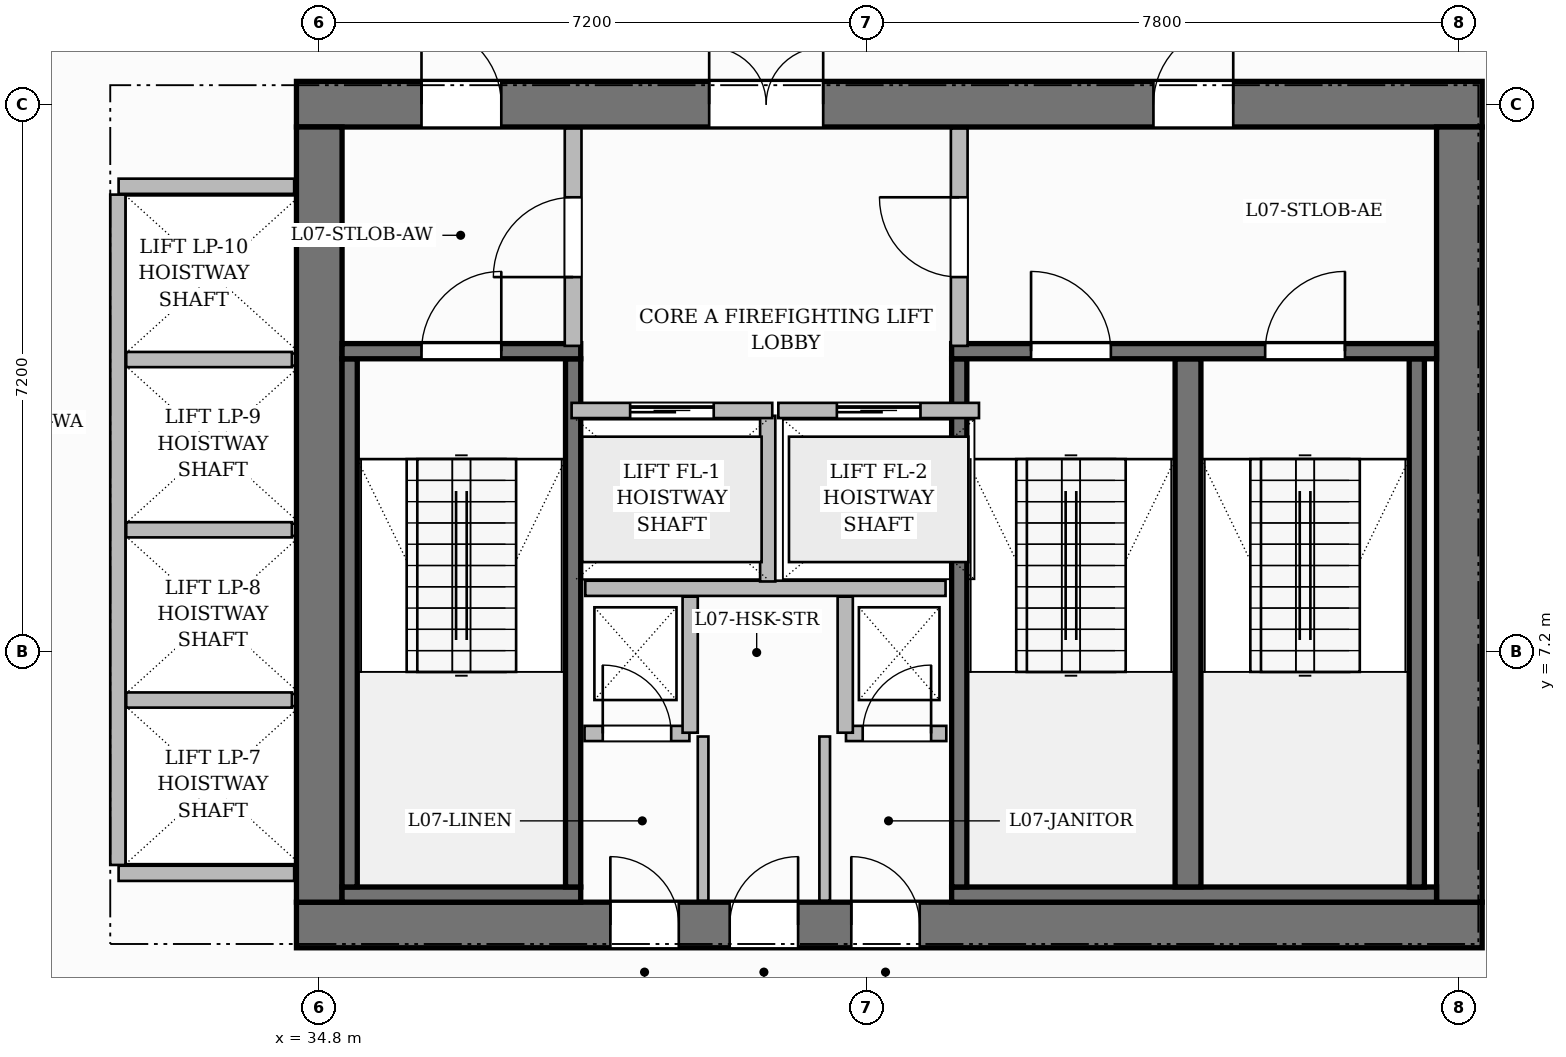
"""IFC4 building model, lengths in metres.
Left out: names, types, materials, properties, quantities, classifications, styles, units other than length and angle.
Written with IfcOpenShell. Run it as: python <this file> out.ifc"""

import sys

from ifc_helpers import new_model, si_unit, direction, frame, frame_2d, origin, place, context, subcontext, project, spatial, rectangle, extrude, source, transform, mapped, element, fill, save


model = new_model("IFC4")
c1 = context("Model", 3, precision=1e-05, world=origin(), true_north=direction((0.0, 1.0)))
c2 = subcontext(c1, "Body", "Model", "MODEL_VIEW")
j1 = project(units=[si_unit("LENGTHUNIT", "METRE"), si_unit("PLANEANGLEUNIT", "RADIAN")], contexts=[c1])
p1 = place(None, origin())
s1 = spatial("IfcSite", under=j1, at=p1, CompositionType="ELEMENT")
p2 = place(p1, origin())
s2 = spatial("IfcBuilding", under=s1, at=p2, CompositionType="ELEMENT")
p3 = place(p2, frame((0.0, 0.0, 36.1)))
s3 = spatial("IfcBuildingStorey", under=s2, at=p3, CompositionType="ELEMENT", Elevation=36.1)
p4 = place(p3, frame((34.5, 3.6, 0.0), z_axis=(0.0, 0.0, 1.0), x_axis=(1.0, 0.0, 0.0)))
e1 = element("IfcWall", 1, at=p4, inside=s3, PredefinedType="SHEAR", context=c2, shape_type="SweptSolid", body=[
    extrude(rectangle(XDim=15.6, YDim=0.6, at=frame_2d((7.8, 0.0))), origin(), (0.0, 0.0, 1.0), 3.7),
])
p5 = place(p4, frame((4.13, 0.0, 0.0)))
e2 = element("IfcOpeningElement", 2, at=p5, cuts=e1, PredefinedType="OPENING", context=c2, shape_type="SweptSolid", body=[
    extrude(rectangle(XDim=0.9, YDim=2.1, at=frame_2d((0.45, 1.05))), frame((0.0, 0.31, 0.0), z_axis=(0.0, -1.0, 0.0), x_axis=(1.0, 0.0, 0.0)), (0.0, 0.0, 1.0), 0.62),
])
p6 = place(p4, frame((5.7, 0.0, 0.0)))
e3 = element("IfcOpeningElement", 3, at=p6, cuts=e1, PredefinedType="OPENING", context=c2, shape_type="SweptSolid", body=[
    extrude(rectangle(XDim=0.9, YDim=2.1, at=frame_2d((0.45, 1.05))), frame((0.0, 0.31, 0.0), z_axis=(0.0, -1.0, 0.0), x_axis=(1.0, 0.0, 0.0)), (0.0, 0.0, 1.0), 0.62),
])
p7 = place(p4, frame((7.3, 0.0, 0.0)))
e4 = element("IfcOpeningElement", 4, at=p7, cuts=e1, PredefinedType="OPENING", context=c2, shape_type="SweptSolid", body=[
    extrude(rectangle(XDim=0.9, YDim=2.1, at=frame_2d((0.45, 1.05))), frame((0.0, 0.31, 0.0), z_axis=(0.0, -1.0, 0.0), x_axis=(1.0, 0.0, 0.0)), (0.0, 0.0, 1.0), 0.62),
])
p8 = place(p3, frame((34.5, 14.4, 0.0), z_axis=(0.0, 0.0, 1.0), x_axis=(1.0, 0.0, 0.0)))
e5 = element("IfcWall", 5, at=p8, inside=s3, PredefinedType="SHEAR", context=c2, shape_type="SweptSolid", body=[
    extrude(rectangle(XDim=15.6, YDim=0.6, at=frame_2d((7.8, 0.0))), origin(), (0.0, 0.0, 1.0), 3.7),
])
p9 = place(p8, frame((5.43, 0.0, 0.0)))
e6 = element("IfcOpeningElement", 6, at=p9, cuts=e5, PredefinedType="OPENING", context=c2, shape_type="SweptSolid", body=[
    extrude(rectangle(XDim=1.5, YDim=2.2, at=frame_2d((0.75, 1.1))), frame((0.0, 0.31, 0.0), z_axis=(0.0, -1.0, 0.0), x_axis=(1.0, 0.0, 0.0)), (0.0, 0.0, 1.0), 0.62),
])
p10 = place(p8, frame((1.645, 0.0, 0.0)))
e7 = element("IfcOpeningElement", 7, at=p10, cuts=e5, PredefinedType="OPENING", context=c2, shape_type="SweptSolid", body=[
    extrude(rectangle(XDim=1.05, YDim=2.15, at=frame_2d((0.525, 1.075))), frame((0.0, 0.31, 0.0), z_axis=(0.0, -1.0, 0.0), x_axis=(1.0, 0.0, 0.0)), (0.0, 0.0, 1.0), 0.62),
])
p11 = place(p8, frame((11.275, 0.0, 0.0)))
e8 = element("IfcOpeningElement", 8, at=p11, cuts=e5, PredefinedType="OPENING", context=c2, shape_type="SweptSolid", body=[
    extrude(rectangle(XDim=1.05, YDim=2.15, at=frame_2d((0.525, 1.075))), frame((0.0, 0.31, 0.0), z_axis=(0.0, -1.0, 0.0), x_axis=(1.0, 0.0, 0.0)), (0.0, 0.0, 1.0), 0.62),
])
for number, where, z_axis, x_axis in (
    (9, (34.8, 3.9, 0.0), (0.0, 0.0, 1.0), (0.0, 1.0, 0.0)),
    (10, (49.8, 3.9, 0.0), (0.0, 0.0, 1.0), (0.0, 1.0, 0.0)),
):
    element("IfcWall", number, at=place(p3, frame(where, z_axis=z_axis, x_axis=x_axis)), inside=s3, PredefinedType="SHEAR", context=c2, shape_type="SweptSolid", body=[
        extrude(rectangle(XDim=10.2, YDim=0.6, at=frame_2d((5.1, 0.0))), origin(), (0.0, 0.0, 1.0), 3.7),
    ])
p12 = place(p3, frame((35.1, 4.0, 0.0), z_axis=(0.0, 0.0, 1.0), x_axis=(1.0, 0.0, 0.0)))
e11 = element("IfcWall", 11, at=p12, inside=s3, PredefinedType="SHEAR", context=c2, shape_type="SweptSolid", body=[
    extrude(rectangle(XDim=3.14, YDim=0.2, at=frame_2d((1.57, 0.0))), origin(), (0.0, 0.0, 1.0), 3.7),
])
for number, where, z_axis, x_axis in (
    (12, (35.2, 4.1, 0.0), (0.0, 0.0, 1.0), (0.0, 1.0, 0.0)),
    (13, (38.14, 4.1, 0.0), (0.0, 0.0, 1.0), (0.0, 1.0, 0.0)),
):
    element("IfcWall", number, at=place(p3, frame(where, z_axis=z_axis, x_axis=x_axis)), inside=s3, PredefinedType="SHEAR", context=c2, shape_type="SweptSolid", body=[
        extrude(rectangle(XDim=6.95, YDim=0.2, at=frame_2d((3.475, 0.0))), origin(), (0.0, 0.0, 1.0), 3.7),
    ])
p13 = place(p3, frame((35.1, 11.15, 0.0), z_axis=(0.0, 0.0, 1.0), x_axis=(1.0, 0.0, 0.0)))
e14 = element("IfcWall", 14, at=p13, inside=s3, PredefinedType="SHEAR", context=c2, shape_type="SweptSolid", body=[
    extrude(rectangle(XDim=3.14, YDim=0.2, at=frame_2d((1.57, 0.0))), origin(), (0.0, 0.0, 1.0), 3.7),
])
p14 = place(p13, frame((1.045, 0.0, 0.0)))
e15 = element("IfcOpeningElement", 15, at=p14, cuts=e14, PredefinedType="OPENING", context=c2, shape_type="SweptSolid", body=[
    extrude(rectangle(XDim=1.05, YDim=2.2, at=frame_2d((0.525, 1.1))), frame((0.0, 0.11, 0.0), z_axis=(0.0, -1.0, 0.0), x_axis=(1.0, 0.0, 0.0)), (0.0, 0.0, 1.0), 0.22),
])
p15 = place(p3, frame((43.12, 4.0, 0.0), z_axis=(0.0, 0.0, 1.0), x_axis=(1.0, 0.0, 0.0)))
e16 = element("IfcWall", 16, at=p15, inside=s3, PredefinedType="SHEAR", context=c2, shape_type="SweptSolid", body=[
    extrude(rectangle(XDim=6.38, YDim=0.2, at=frame_2d((3.19, 0.0))), origin(), (0.0, 0.0, 1.0), 3.7),
])
p16 = place(p3, frame((43.22, 4.1, 0.0), z_axis=(0.0, 0.0, 1.0), x_axis=(0.0, 1.0, 0.0)))
e17 = element("IfcWall", 17, at=p16, inside=s3, PredefinedType="SHEAR", context=c2, shape_type="SweptSolid", body=[
    extrude(rectangle(XDim=6.95, YDim=0.2, at=frame_2d((3.475, 0.0))), origin(), (0.0, 0.0, 1.0), 3.7),
])
p17 = place(p3, frame((46.23, 4.1, 0.0), z_axis=(0.0, 0.0, 1.0), x_axis=(0.0, 1.0, 0.0)))
e18 = element("IfcWall", 18, at=p17, inside=s3, PredefinedType="SHEAR", context=c2, shape_type="SweptSolid", body=[
    extrude(rectangle(XDim=6.95, YDim=0.34, at=frame_2d((3.475, 0.0))), origin(), (0.0, 0.0, 1.0), 3.7),
])
p18 = place(p3, frame((49.24, 4.1, 0.0), z_axis=(0.0, 0.0, 1.0), x_axis=(0.0, 1.0, 0.0)))
e19 = element("IfcWall", 19, at=p18, inside=s3, PredefinedType="SHEAR", context=c2, shape_type="SweptSolid", body=[
    extrude(rectangle(XDim=6.95, YDim=0.2, at=frame_2d((3.475, 0.0))), origin(), (0.0, 0.0, 1.0), 3.7),
])
p19 = place(p3, frame((43.12, 11.15, 0.0), z_axis=(0.0, 0.0, 1.0), x_axis=(1.0, 0.0, 0.0)))
e20 = element("IfcWall", 20, at=p19, inside=s3, PredefinedType="SHEAR", context=c2, shape_type="SweptSolid", body=[
    extrude(rectangle(XDim=6.38, YDim=0.2, at=frame_2d((3.19, 0.0))), origin(), (0.0, 0.0, 1.0), 3.7),
])
p20 = place(p19, frame((1.045, 0.0, 0.0)))
e21 = element("IfcOpeningElement", 21, at=p20, cuts=e20, PredefinedType="OPENING", context=c2, shape_type="SweptSolid", body=[
    extrude(rectangle(XDim=1.05, YDim=2.2, at=frame_2d((0.525, 1.1))), frame((0.0, 0.11, 0.0), z_axis=(0.0, -1.0, 0.0), x_axis=(1.0, 0.0, 0.0)), (0.0, 0.0, 1.0), 0.22),
])
p21 = place(p19, frame((4.125, 0.0, 0.0)))
e22 = element("IfcOpeningElement", 22, at=p21, cuts=e20, PredefinedType="OPENING", context=c2, shape_type="SweptSolid", body=[
    extrude(rectangle(XDim=1.05, YDim=2.2, at=frame_2d((0.525, 1.1))), frame((0.0, 0.11, 0.0), z_axis=(0.0, -1.0, 0.0), x_axis=(1.0, 0.0, 0.0)), (0.0, 0.0, 1.0), 0.22),
])
p22 = place(p3, frame((38.3, 8.03, 0.0), z_axis=(0.0, 0.0, 1.0), x_axis=(1.0, 0.0, 0.0)))
e23 = element("IfcWall", 23, at=p22, inside=s3, PredefinedType="PARTITIONING", context=c2, shape_type="SweptSolid", body=[
    extrude(rectangle(XDim=4.74, YDim=0.2, at=frame_2d((2.37, 0.0))), origin(), (0.0, 0.0, 1.0), 3.45),
])
p23 = place(p3, frame((40.7, 8.12, 0.0), z_axis=(0.0, 0.0, 1.0), x_axis=(0.0, 1.0, 0.0)))
e24 = element("IfcWall", 24, at=p23, inside=s3, PredefinedType="PARTITIONING", context=c2, shape_type="SweptSolid", body=[
    extrude(rectangle(XDim=2.18, YDim=0.2, at=frame_2d((1.09, 0.0))), origin(), (0.0, 0.0, 1.0), 3.45),
])
p24 = place(p3, frame((38.14, 11.22, 0.0), z_axis=(0.0, 0.0, 1.0), x_axis=(0.0, 1.0, 0.0)))
e25 = element("IfcWall", 25, at=p24, inside=s3, PredefinedType="PARTITIONING", context=c2, shape_type="SweptSolid", body=[
    extrude(rectangle(XDim=2.86, YDim=0.22, at=frame_2d((1.43, 0.0))), origin(), (0.0, 0.0, 1.0), 3.45),
])
p25 = place(p24, frame((0.905, 0.0, 0.0)))
e26 = element("IfcOpeningElement", 26, at=p25, cuts=e25, PredefinedType="OPENING", context=c2, shape_type="SweptSolid", body=[
    extrude(rectangle(XDim=1.05, YDim=2.15, at=frame_2d((0.525, 1.075))), frame((0.0, 0.12, 0.0), z_axis=(0.0, -1.0, 0.0), x_axis=(1.0, 0.0, 0.0)), (0.0, 0.0, 1.0), 0.24),
])
p26 = place(p3, frame((43.22, 11.22, 0.0), z_axis=(0.0, 0.0, 1.0), x_axis=(0.0, 1.0, 0.0)))
e27 = element("IfcWall", 27, at=p26, inside=s3, PredefinedType="PARTITIONING", context=c2, shape_type="SweptSolid", body=[
    extrude(rectangle(XDim=2.86, YDim=0.22, at=frame_2d((1.43, 0.0))), origin(), (0.0, 0.0, 1.0), 3.45),
])
p27 = place(p26, frame((0.905, 0.0, 0.0)))
e28 = element("IfcOpeningElement", 28, at=p27, cuts=e27, PredefinedType="OPENING", context=c2, shape_type="SweptSolid", body=[
    extrude(rectangle(XDim=1.05, YDim=2.15, at=frame_2d((0.525, 1.075))), frame((0.0, 0.12, 0.0), z_axis=(0.0, -1.0, 0.0), x_axis=(1.0, 0.0, 0.0)), (0.0, 0.0, 1.0), 0.24),
])
p28 = place(p3, frame((38.29, 6.12, 0.0), z_axis=(0.0, 0.0, 1.0), x_axis=(1.0, 0.0, 0.0)))
e29 = element("IfcWall", 29, at=p28, inside=s3, PredefinedType="PARTITIONING", context=c2, shape_type="SweptSolid", body=[
    extrude(rectangle(XDim=1.38, YDim=0.2, at=frame_2d((0.69, 0.0))), origin(), (0.0, 0.0, 1.0), 3.45),
])
p29 = place(p28, frame((0.24, 0.0, 0.0)))
e30 = element("IfcOpeningElement", 30, at=p29, cuts=e29, PredefinedType="OPENING", context=c2, shape_type="SweptSolid", body=[
    extrude(rectangle(XDim=0.9, YDim=2.1, at=frame_2d((0.45, 1.05))), frame((0.0, 0.11, 0.0), z_axis=(0.0, -1.0, 0.0), x_axis=(1.0, 0.0, 0.0)), (0.0, 0.0, 1.0), 0.22),
])
p30 = place(p3, frame((39.68, 6.13, 0.0), z_axis=(0.0, 0.0, 1.0), x_axis=(0.0, 1.0, 0.0)))
e31 = element("IfcWall", 31, at=p30, inside=s3, PredefinedType="PARTITIONING", context=c2, shape_type="SweptSolid", body=[
    extrude(rectangle(XDim=1.79, YDim=0.2, at=frame_2d((0.895, 0.0))), origin(), (0.0, 0.0, 1.0), 3.45),
])
p31 = place(p3, frame((41.73, 6.12, 0.0), z_axis=(0.0, 0.0, 1.0), x_axis=(1.0, 0.0, 0.0)))
e32 = element("IfcWall", 32, at=p31, inside=s3, PredefinedType="PARTITIONING", context=c2, shape_type="SweptSolid", body=[
    extrude(rectangle(XDim=1.32, YDim=0.2, at=frame_2d((0.66, 0.0))), origin(), (0.0, 0.0, 1.0), 3.45),
])
p32 = place(p31, frame((0.22, 0.0, 0.0)))
e33 = element("IfcOpeningElement", 33, at=p32, cuts=e32, PredefinedType="OPENING", context=c2, shape_type="SweptSolid", body=[
    extrude(rectangle(XDim=0.9, YDim=2.1, at=frame_2d((0.45, 1.05))), frame((0.0, 0.11, 0.0), z_axis=(0.0, -1.0, 0.0), x_axis=(1.0, 0.0, 0.0)), (0.0, 0.0, 1.0), 0.22),
])
p33 = place(p3, frame((41.72, 6.13, 0.0), z_axis=(0.0, 0.0, 1.0), x_axis=(0.0, 1.0, 0.0)))
e34 = element("IfcWall", 34, at=p33, inside=s3, PredefinedType="PARTITIONING", context=c2, shape_type="SweptSolid", body=[
    extrude(rectangle(XDim=1.79, YDim=0.2, at=frame_2d((0.895, 0.0))), origin(), (0.0, 0.0, 1.0), 3.45),
])
for number, where, z_axis, x_axis in (
    (35, (39.85, 3.92, 0.0), (0.0, 0.0, 1.0), (0.0, 1.0, 0.0)),
    (36, (41.45, 3.92, 0.0), (0.0, 0.0, 1.0), (0.0, 1.0, 0.0)),
):
    element("IfcWall", number, at=place(p3, frame(where, z_axis=z_axis, x_axis=x_axis)), inside=s3, PredefinedType="PARTITIONING", context=c2, shape_type="SweptSolid", body=[
        extrude(rectangle(XDim=2.16, YDim=0.14, at=frame_2d((1.08, 0.0))), origin(), (0.0, 0.0, 1.0), 3.45),
    ])
for number, where, z_axis, x_axis in (
    (37, (32.16, 4.28, 0.0), (0.0, 0.0, 1.0), (1.0, 0.0, 0.0)),
    (38, (32.16, 13.32, 0.0), (0.0, 0.0, 1.0), (1.0, 0.0, 0.0)),
):
    element("IfcWall", number, at=place(p3, frame(where, z_axis=z_axis, x_axis=x_axis)), inside=s3, PredefinedType="PARTITIONING", context=c2, shape_type="SweptSolid", body=[
        extrude(rectangle(XDim=2.31, YDim=0.2, at=frame_2d((1.155, 0.0))), origin(), (0.0, 0.0, 1.0), 3.45),
    ])
p34 = place(p3, frame((32.15, 4.39, 0.0), z_axis=(0.0, 0.0, 1.0), x_axis=(0.0, 1.0, 0.0)))
e39 = element("IfcWall", 39, at=p34, inside=s3, PredefinedType="PARTITIONING", context=c2, shape_type="SweptSolid", body=[
    extrude(rectangle(XDim=8.82, YDim=0.2, at=frame_2d((4.41, 0.0))), origin(), (0.0, 0.0, 1.0), 3.45),
])
for number, where, z_axis, x_axis in (
    (40, (32.26, 6.56, 0.0), (0.0, 0.0, 1.0), (1.0, 0.0, 0.0)),
    (41, (32.26, 8.8, 0.0), (0.0, 0.0, 1.0), (1.0, 0.0, 0.0)),
    (42, (32.26, 11.04, 0.0), (0.0, 0.0, 1.0), (1.0, 0.0, 0.0)),
):
    element("IfcWall", number, at=place(p3, frame(where, z_axis=z_axis, x_axis=x_axis)), inside=s3, PredefinedType="PARTITIONING", context=c2, shape_type="SweptSolid", body=[
        extrude(rectangle(XDim=2.18, YDim=0.2, at=frame_2d((1.09, 0.0))), origin(), (0.0, 0.0, 1.0), 3.45),
    ])
p35 = place(p3, frame((38.12, 10.37, 0.0), z_axis=(0.0, 0.0, 1.0), x_axis=(1.0, 0.0, 0.0)))
e43 = element("IfcWall", 43, at=p35, inside=s3, PredefinedType="PARTITIONING", context=c2, shape_type="SweptSolid", body=[
    extrude(rectangle(XDim=2.64, YDim=0.2, at=frame_2d((1.32, 0.0))), origin(), (0.0, 0.0, 1.0), 3.45),
])
p36 = place(p35, frame((0.77, 0.0, 0.0)))
e44 = element("IfcOpeningElement", 44, at=p36, cuts=e43, PredefinedType="OPENING", context=c2, shape_type="SweptSolid", body=[
    extrude(rectangle(XDim=1.1, YDim=2.2, at=frame_2d((0.55, 1.1))), frame((0.0, 0.11, 0.0), z_axis=(0.0, -1.0, 0.0), x_axis=(1.0, 0.0, 0.0)), (0.0, 0.0, 1.0), 0.22),
])
p37 = place(p3, frame((40.84, 10.37, 0.0), z_axis=(0.0, 0.0, 1.0), x_axis=(1.0, 0.0, 0.0)))
e45 = element("IfcWall", 45, at=p37, inside=s3, PredefinedType="PARTITIONING", context=c2, shape_type="SweptSolid", body=[
    extrude(rectangle(XDim=2.64, YDim=0.2, at=frame_2d((1.32, 0.0))), origin(), (0.0, 0.0, 1.0), 3.45),
])
p38 = place(p37, frame((0.77, 0.0, 0.0)))
e46 = element("IfcOpeningElement", 46, at=p38, cuts=e45, PredefinedType="OPENING", context=c2, shape_type="SweptSolid", body=[
    extrude(rectangle(XDim=1.1, YDim=2.2, at=frame_2d((0.55, 1.1))), frame((0.0, 0.11, 0.0), z_axis=(0.0, -1.0, 0.0), x_axis=(1.0, 0.0, 0.0)), (0.0, 0.0, 1.0), 0.22),
])
m1 = source(origin(), c2, "Body", "SweptSolid", [
    extrude(rectangle(XDim=1.05, YDim=2.2, at=frame_2d((0.525, 1.1))), frame((0.0, 0.025, 0.0), z_axis=(0.0, -1.0, 0.0), x_axis=(1.0, 0.0, 0.0)), (0.0, 0.0, 1.0), 0.05),
])
p39 = place(p14, origin())
e47 = element("IfcDoor", 47, at=p39, inside=s3, OperationType="SINGLE_SWING_RIGHT", PredefinedType="DOOR", context=c2, shape_type="MappedRepresentation", body=[
    mapped(m1, transform((0.0, 0.0, 0.0), scale=1.0)),
])
fill(e15, e47)
p40 = place(p20, origin())
e48 = element("IfcDoor", 48, at=p40, inside=s3, OperationType="SINGLE_SWING_LEFT", PredefinedType="DOOR", context=c2, shape_type="MappedRepresentation", body=[
    mapped(m1, transform((0.0, 0.0, 0.0), scale=1.0)),
])
fill(e21, e48)
p41 = place(p21, origin())
e49 = element("IfcDoor", 49, at=p41, inside=s3, OperationType="SINGLE_SWING_RIGHT", PredefinedType="DOOR", context=c2, shape_type="MappedRepresentation", body=[
    mapped(m1, transform((0.0, 0.0, 0.0), scale=1.0)),
])
fill(e22, e49)
m2 = source(origin(), c2, "Body", "SweptSolid", [
    extrude(rectangle(XDim=1.05, YDim=2.15, at=frame_2d((0.525, 1.075))), frame((0.0, 0.025, 0.0), z_axis=(0.0, -1.0, 0.0), x_axis=(1.0, 0.0, 0.0)), (0.0, 0.0, 1.0), 0.05),
])
p42 = place(p25, origin())
e50 = element("IfcDoor", 50, at=p42, inside=s3, OperationType="SINGLE_SWING_LEFT", PredefinedType="DOOR", context=c2, shape_type="MappedRepresentation", body=[
    mapped(m2, transform((0.0, 0.0, 0.0), scale=1.0)),
])
fill(e26, e50)
p43 = place(p27, origin())
e51 = element("IfcDoor", 51, at=p43, inside=s3, OperationType="SINGLE_SWING_RIGHT", PredefinedType="DOOR", context=c2, shape_type="MappedRepresentation", body=[
    mapped(m2, transform((0.0, 0.0, 0.0), scale=1.0)),
])
fill(e28, e51)
m3 = source(origin(), c2, "Body", "SweptSolid", [
    extrude(rectangle(XDim=1.5, YDim=2.2, at=frame_2d((0.75, 1.1))), frame((0.0, 0.025, 0.0), z_axis=(0.0, -1.0, 0.0), x_axis=(1.0, 0.0, 0.0)), (0.0, 0.0, 1.0), 0.05),
])
p44 = place(p9, origin())
e52 = element("IfcDoor", 52, at=p44, inside=s3, OperationType="DOUBLE_DOOR_SINGLE_SWING", PredefinedType="DOOR", context=c2, shape_type="MappedRepresentation", body=[
    mapped(m3, transform((0.0, 0.0, 0.0), scale=1.0)),
])
fill(e6, e52)
p45 = place(p10, origin())
e53 = element("IfcDoor", 53, at=p45, inside=s3, OperationType="SINGLE_SWING_LEFT", PredefinedType="DOOR", context=c2, shape_type="MappedRepresentation", body=[
    mapped(m2, transform((0.0, 0.0, 0.0), scale=1.0)),
])
fill(e7, e53)
p46 = place(p11, origin())
e54 = element("IfcDoor", 54, at=p46, inside=s3, OperationType="SINGLE_SWING_RIGHT", PredefinedType="DOOR", context=c2, shape_type="MappedRepresentation", body=[
    mapped(m2, transform((0.0, 0.0, 0.0), scale=1.0)),
])
fill(e8, e54)
m4 = source(origin(), c2, "Body", "SweptSolid", [
    extrude(rectangle(XDim=0.9, YDim=2.1, at=frame_2d((0.45, 1.05))), frame((0.0, 0.025, 0.0), z_axis=(0.0, -1.0, 0.0), x_axis=(1.0, 0.0, 0.0)), (0.0, 0.0, 1.0), 0.05),
])
p47 = place(p29, origin())
e55 = element("IfcDoor", 55, at=p47, inside=s3, OperationType="SINGLE_SWING_LEFT", PredefinedType="DOOR", context=c2, shape_type="MappedRepresentation", body=[
    mapped(m4, transform((0.0, 0.0, 0.0), scale=1.0)),
])
fill(e30, e55)
p48 = place(p32, origin())
e56 = element("IfcDoor", 56, at=p48, inside=s3, OperationType="SINGLE_SWING_RIGHT", PredefinedType="DOOR", context=c2, shape_type="MappedRepresentation", body=[
    mapped(m4, transform((0.0, 0.0, 0.0), scale=1.0)),
])
fill(e33, e56)
p49 = place(p5, origin())
e57 = element("IfcDoor", 57, at=p49, inside=s3, OperationType="SINGLE_SWING_LEFT", PredefinedType="DOOR", context=c2, shape_type="MappedRepresentation", body=[
    mapped(m4, transform((0.0, 0.0, 0.0), scale=1.0)),
])
fill(e2, e57)
p50 = place(p6, origin())
e58 = element("IfcDoor", 58, at=p50, inside=s3, OperationType="SINGLE_SWING_RIGHT", PredefinedType="DOOR", context=c2, shape_type="MappedRepresentation", body=[
    mapped(m4, transform((0.0, 0.0, 0.0), scale=1.0)),
])
fill(e3, e58)
p51 = place(p7, origin())
e59 = element("IfcDoor", 59, at=p51, inside=s3, OperationType="SINGLE_SWING_LEFT", PredefinedType="DOOR", context=c2, shape_type="MappedRepresentation", body=[
    mapped(m4, transform((0.0, 0.0, 0.0), scale=1.0)),
])
fill(e4, e59)
m5 = source(origin(), c2, "Body", "SweptSolid", [
    extrude(rectangle(XDim=1.1, YDim=2.2, at=frame_2d((0.55, 1.1))), frame((0.0, 0.025, 0.0), z_axis=(0.0, -1.0, 0.0), x_axis=(1.0, 0.0, 0.0)), (0.0, 0.0, 1.0), 0.05),
])
p52 = place(p36, origin())
e60 = element("IfcDoor", 60, at=p52, inside=s3, OperationType="SLIDING_TO_LEFT", PredefinedType="DOOR", context=c2, shape_type="MappedRepresentation", body=[
    mapped(m5, transform((0.0, 0.0, 0.0), scale=1.0)),
])
fill(e44, e60)
p53 = place(p38, origin())
e61 = element("IfcDoor", 61, at=p53, inside=s3, OperationType="SLIDING_TO_LEFT", PredefinedType="DOOR", context=c2, shape_type="MappedRepresentation", body=[
    mapped(m5, transform((0.0, 0.0, 0.0), scale=1.0)),
])
fill(e46, e61)
save(model, sys.argv[1])
